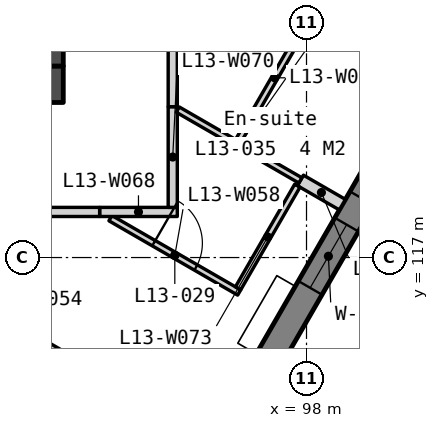
"""IFC4 building model, lengths in metres.
Left out: names, types, materials, properties, quantities, classifications, styles, units other than length and angle.
Written with IfcOpenShell. Run it as: python <this file> out.ifc"""

import sys

from ifc_helpers import new_model, si_unit, direction, frame, frame_2d, origin, place, context, subcontext, project, spatial, polyline, rectangle, outline, extrude, element, fill, save


model = new_model("IFC4")
c1 = context("Model", 3, precision=1e-05, world=origin(), true_north=direction((0.0, 1.0)))
c2 = subcontext(c1, "Body", "Model", "MODEL_VIEW")
j1 = project(units=[si_unit("LENGTHUNIT", "METRE"), si_unit("PLANEANGLEUNIT", "RADIAN")], contexts=[c1])
p1 = place(None, origin())
s1 = spatial("IfcSite", under=j1, at=p1, CompositionType="ELEMENT")
p2 = place(p1, origin())
s2 = spatial("IfcBuilding", under=s1, at=p2, CompositionType="ELEMENT")
p3 = place(p2, frame((0.0, 0.0, 59.5)))
s3 = spatial("IfcBuildingStorey", under=s2, at=p3, CompositionType="ELEMENT", Elevation=59.5)
p4 = place(p3, frame((66.0, 119.85, 0.0), z_axis=(0.0, 0.0, 1.0), x_axis=(1.0, 0.0, 0.0)))
e1 = element("IfcWall", 1, at=p4, inside=s3, PredefinedType="SOLIDWALL", context=c2, shape_type="SweptSolid", body=[
    extrude(rectangle(XDim=28.0, YDim=0.6, at=frame_2d((14.0, 0.0))), origin(), (0.0, 0.0, 1.0), 3.35),
])
p5 = place(p4, frame((6.825, 0.0, 0.0)))
e2 = element("IfcOpeningElement", 2, at=p5, cuts=e1, PredefinedType="OPENING", context=c2, shape_type="SweptSolid", body=[
    extrude(rectangle(XDim=1.8, YDim=2.1, at=frame_2d((0.9, 1.05))), frame((0.0, 0.31, 0.0), z_axis=(0.0, -1.0, 0.0), x_axis=(1.0, 0.0, 0.0)), (0.0, 0.0, 1.0), 0.62),
])
p6 = place(p4, frame((15.85, 0.0, 0.0)))
e3 = element("IfcOpeningElement", 3, at=p6, cuts=e1, PredefinedType="OPENING", context=c2, shape_type="SweptSolid", body=[
    extrude(rectangle(XDim=1.5, YDim=2.1, at=frame_2d((0.75, 1.05))), frame((0.0, 0.31, 0.0), z_axis=(0.0, -1.0, 0.0), x_axis=(1.0, 0.0, 0.0)), (0.0, 0.0, 1.0), 0.62),
])
p7 = place(p4, frame((19.375, 0.0, 0.0)))
e4 = element("IfcOpeningElement", 4, at=p7, cuts=e1, PredefinedType="OPENING", context=c2, shape_type="SweptSolid", body=[
    extrude(rectangle(XDim=1.8, YDim=2.1, at=frame_2d((0.9, 1.05))), frame((0.0, 0.31, 0.0), z_axis=(0.0, -1.0, 0.0), x_axis=(1.0, 0.0, 0.0)), (0.0, 0.0, 1.0), 0.62),
])
p8 = place(p4, frame((4.425, 0.0, 0.0)))
e5 = element("IfcOpeningElement", 5, at=p8, cuts=e1, PredefinedType="OPENING", context=c2, shape_type="SweptSolid", body=[
    extrude(rectangle(XDim=1.0, YDim=2.1, at=frame_2d((0.5, 1.05))), frame((0.0, 0.31, 0.0), z_axis=(0.0, -1.0, 0.0), x_axis=(1.0, 0.0, 0.0)), (0.0, 0.0, 1.0), 0.62),
])
p9 = place(p4, frame((9.925, 0.0, 0.0)))
e6 = element("IfcOpeningElement", 6, at=p9, cuts=e1, PredefinedType="OPENING", context=c2, shape_type="SweptSolid", body=[
    extrude(rectangle(XDim=1.0, YDim=2.1, at=frame_2d((0.5, 1.05))), frame((0.0, 0.31, 0.0), z_axis=(0.0, -1.0, 0.0), x_axis=(1.0, 0.0, 0.0)), (0.0, 0.0, 1.0), 0.62),
])
p10 = place(p4, frame((13.125, 0.0, 0.0)))
e7 = element("IfcOpeningElement", 7, at=p10, cuts=e1, PredefinedType="OPENING", context=c2, shape_type="SweptSolid", body=[
    extrude(rectangle(XDim=1.0, YDim=2.1, at=frame_2d((0.5, 1.05))), frame((0.0, 0.31, 0.0), z_axis=(0.0, -1.0, 0.0), x_axis=(1.0, 0.0, 0.0)), (0.0, 0.0, 1.0), 0.62),
])
p11 = place(p4, frame((21.725, 0.0, 0.0)))
e8 = element("IfcOpeningElement", 8, at=p11, cuts=e1, PredefinedType="OPENING", context=c2, shape_type="SweptSolid", body=[
    extrude(rectangle(XDim=1.0, YDim=2.1, at=frame_2d((0.5, 1.05))), frame((0.0, 0.31, 0.0), z_axis=(0.0, -1.0, 0.0), x_axis=(1.0, 0.0, 0.0)), (0.0, 0.0, 1.0), 0.62),
])
p12 = place(p4, frame((23.425, 0.0, 0.0)))
e9 = element("IfcOpeningElement", 9, at=p12, cuts=e1, PredefinedType="OPENING", context=c2, shape_type="SweptSolid", body=[
    extrude(rectangle(XDim=1.0, YDim=2.1, at=frame_2d((0.5, 1.05))), frame((0.0, 0.31, 0.0), z_axis=(0.0, -1.0, 0.0), x_axis=(1.0, 0.0, 0.0)), (0.0, 0.0, 1.0), 0.62),
])
p13 = place(p3, frame((93.7, 133.95, 0.0), z_axis=(0.0, 0.0, 1.0), x_axis=(0.0, -1.0, 0.0)))
e10 = element("IfcWall", 10, at=p13, inside=s3, PredefinedType="SOLIDWALL", context=c2, shape_type="SweptSolid", body=[
    extrude(rectangle(XDim=13.8, YDim=0.6, at=frame_2d((6.9, 0.0))), origin(), (0.0, 0.0, 1.0), 3.35),
])
p14 = place(p13, frame((0.6, 0.0, 0.0)))
e11 = element("IfcOpeningElement", 11, at=p14, cuts=e10, PredefinedType="OPENING", context=c2, shape_type="SweptSolid", body=[
    extrude(rectangle(XDim=1.1, YDim=2.1, at=frame_2d((0.55, 1.05))), frame((0.0, 0.31, 0.0), z_axis=(0.0, -1.0, 0.0), x_axis=(1.0, 0.0, 0.0)), (0.0, 0.0, 1.0), 0.62),
])
p15 = place(p13, frame((10.064, 0.0, 0.0)))
e12 = element("IfcOpeningElement", 12, at=p15, cuts=e10, PredefinedType="OPENING", context=c2, shape_type="SweptSolid", body=[
    extrude(rectangle(XDim=1.0, YDim=2.1, at=frame_2d((0.5, 1.05))), frame((0.0, 0.31, 0.0), z_axis=(0.0, -1.0, 0.0), x_axis=(1.0, 0.0, 0.0)), (0.0, 0.0, 1.0), 0.62),
])
p16 = place(p13, frame((8.35, 0.0, 0.0)))
e13 = element("IfcOpeningElement", 13, at=p16, cuts=e10, PredefinedType="OPENING", context=c2, shape_type="SweptSolid", body=[
    extrude(rectangle(XDim=0.85, YDim=2.1, at=frame_2d((0.425, 1.05))), frame((0.0, 0.31, 0.0), z_axis=(0.0, -1.0, 0.0), x_axis=(1.0, 0.0, 0.0)), (0.0, 0.0, 1.0), 0.62),
])
p17 = place(p13, frame((12.239, 0.0, 0.0)))
e14 = element("IfcOpeningElement", 14, at=p17, cuts=e10, PredefinedType="OPENING", context=c2, shape_type="SweptSolid", body=[
    extrude(rectangle(XDim=1.0, YDim=2.1, at=frame_2d((0.5, 1.05))), frame((0.0, 0.31, 0.0), z_axis=(0.0, -1.0, 0.0), x_axis=(1.0, 0.0, 0.0)), (0.0, 0.0, 1.0), 0.62),
])
p18 = place(p3, frame((83.105, 90.599, -0.15), z_axis=(0.0, 0.0, 1.0), x_axis=(0.499999201451, 0.866025864826, 0.0)))
e15 = element("IfcWall", 15, at=p18, inside=s3, PredefinedType="SOLIDWALL", context=c2, shape_type="SweptSolid", body=[
    extrude(outline(polyline([(44.8, 0.0), (44.8, 3.5), (0.0, 3.5), (0.0, 0.0), (44.8, 0.0)])), frame((0.0, 0.225, 0.0), z_axis=(0.0, -1.0, 0.0), x_axis=(1.0, 0.0, 0.0)), (0.0, 0.0, 1.0), 0.45),
])
p19 = place(p18, frame((3.03, 0.0, 1.05)))
e16 = element("IfcOpeningElement", 16, at=p19, cuts=e15, PredefinedType="OPENING", context=c2, shape_type="SweptSolid", body=[
    extrude(rectangle(XDim=1.2, YDim=1.5, at=frame_2d((0.6, 0.75))), frame((0.0, 0.235, 0.0), z_axis=(0.0, -1.0, 0.0), x_axis=(1.0, 0.0, 0.0)), (0.0, 0.0, 1.0), 0.47),
])
p20 = place(p18, frame((4.73, 0.0, 1.05)))
e17 = element("IfcOpeningElement", 17, at=p20, cuts=e15, PredefinedType="OPENING", context=c2, shape_type="SweptSolid", body=[
    extrude(rectangle(XDim=1.2, YDim=1.5, at=frame_2d((0.6, 0.75))), frame((0.0, 0.235, 0.0), z_axis=(0.0, -1.0, 0.0), x_axis=(1.0, 0.0, 0.0)), (0.0, 0.0, 1.0), 0.47),
])
p21 = place(p18, frame((11.99, 0.0, 1.05)))
e18 = element("IfcOpeningElement", 18, at=p21, cuts=e15, PredefinedType="OPENING", context=c2, shape_type="SweptSolid", body=[
    extrude(rectangle(XDim=1.2, YDim=1.5, at=frame_2d((0.6, 0.75))), frame((0.0, 0.235, 0.0), z_axis=(0.0, -1.0, 0.0), x_axis=(1.0, 0.0, 0.0)), (0.0, 0.0, 1.0), 0.47),
])
p22 = place(p18, frame((13.69, 0.0, 1.05)))
e19 = element("IfcOpeningElement", 19, at=p22, cuts=e15, PredefinedType="OPENING", context=c2, shape_type="SweptSolid", body=[
    extrude(rectangle(XDim=1.2, YDim=1.5, at=frame_2d((0.6, 0.75))), frame((0.0, 0.235, 0.0), z_axis=(0.0, -1.0, 0.0), x_axis=(1.0, 0.0, 0.0)), (0.0, 0.0, 1.0), 0.47),
])
p23 = place(p18, frame((20.95, 0.0, 1.05)))
e20 = element("IfcOpeningElement", 20, at=p23, cuts=e15, PredefinedType="OPENING", context=c2, shape_type="SweptSolid", body=[
    extrude(rectangle(XDim=1.2, YDim=1.5, at=frame_2d((0.6, 0.75))), frame((0.0, 0.235, 0.0), z_axis=(0.0, -1.0, 0.0), x_axis=(1.0, 0.0, 0.0)), (0.0, 0.0, 1.0), 0.47),
])
p24 = place(p18, frame((22.65, 0.0, 1.05)))
e21 = element("IfcOpeningElement", 21, at=p24, cuts=e15, PredefinedType="OPENING", context=c2, shape_type="SweptSolid", body=[
    extrude(rectangle(XDim=1.2, YDim=1.5, at=frame_2d((0.6, 0.75))), frame((0.0, 0.235, 0.0), z_axis=(0.0, -1.0, 0.0), x_axis=(1.0, 0.0, 0.0)), (0.0, 0.0, 1.0), 0.47),
])
p25 = place(p18, frame((29.91, 0.0, 1.05)))
e22 = element("IfcOpeningElement", 22, at=p25, cuts=e15, PredefinedType="OPENING", context=c2, shape_type="SweptSolid", body=[
    extrude(rectangle(XDim=1.2, YDim=1.5, at=frame_2d((0.6, 0.75))), frame((0.0, 0.235, 0.0), z_axis=(0.0, -1.0, 0.0), x_axis=(1.0, 0.0, 0.0)), (0.0, 0.0, 1.0), 0.47),
])
p26 = place(p18, frame((31.61, 0.0, 1.05)))
e23 = element("IfcOpeningElement", 23, at=p26, cuts=e15, PredefinedType="OPENING", context=c2, shape_type="SweptSolid", body=[
    extrude(rectangle(XDim=1.2, YDim=1.5, at=frame_2d((0.6, 0.75))), frame((0.0, 0.235, 0.0), z_axis=(0.0, -1.0, 0.0), x_axis=(1.0, 0.0, 0.0)), (0.0, 0.0, 1.0), 0.47),
])
p27 = place(p18, frame((38.87, 0.0, 1.05)))
e24 = element("IfcOpeningElement", 24, at=p27, cuts=e15, PredefinedType="OPENING", context=c2, shape_type="SweptSolid", body=[
    extrude(rectangle(XDim=1.2, YDim=1.5, at=frame_2d((0.6, 0.75))), frame((0.0, 0.235, 0.0), z_axis=(0.0, -1.0, 0.0), x_axis=(1.0, 0.0, 0.0)), (0.0, 0.0, 1.0), 0.47),
])
p28 = place(p18, frame((40.57, 0.0, 1.05)))
e25 = element("IfcOpeningElement", 25, at=p28, cuts=e15, PredefinedType="OPENING", context=c2, shape_type="SweptSolid", body=[
    extrude(rectangle(XDim=1.2, YDim=1.5, at=frame_2d((0.6, 0.75))), frame((0.0, 0.235, 0.0), z_axis=(0.0, -1.0, 0.0), x_axis=(1.0, 0.0, 0.0)), (0.0, 0.0, 1.0), 0.47),
])
p29 = place(p3, frame((90.751, 117.223, 0.0), z_axis=(0.0, 0.0, 1.0), x_axis=(0.866015162859, -0.500017737384, 0.0)))
e26 = element("IfcWall", 26, at=p29, inside=s3, PredefinedType="PARTITIONING", context=c2, shape_type="SweptSolid", body=[
    extrude(rectangle(XDim=6.465, YDim=0.2, at=frame_2d((3.232, 0.0))), origin(), (0.0, 0.0, 1.0), 3.35),
])
p30 = place(p3, frame((94.775, 117.647, 0.0), z_axis=(0.0, 0.0, 1.0), x_axis=(0.86604092097, -0.499973122483, 0.0)))
e27 = element("IfcWall", 27, at=p30, inside=s3, PredefinedType="PARTITIONING", context=c2, shape_type="SweptSolid", body=[
    extrude(rectangle(XDim=2.445, YDim=0.1, at=frame_2d((1.223, 0.0))), origin(), (0.0, 0.0, 1.0), 3.35),
])
p31 = place(p30, frame((0.823, 0.0, 0.0)))
e28 = element("IfcOpeningElement", 28, at=p31, cuts=e27, PredefinedType="OPENING", context=c2, shape_type="SweptSolid", body=[
    extrude(rectangle(XDim=0.8, YDim=2.1, at=frame_2d((0.4, 1.05))), frame((0.0, 0.06, 0.0), z_axis=(0.0, -1.0, 0.0), x_axis=(1.0, 0.0, 0.0)), (0.0, 0.0, 1.0), 0.12),
])
p32 = place(p3, frame((94.598, 117.75, 0.0), z_axis=(0.0, 0.0, 1.0), x_axis=(1.0, 0.0, 0.0)))
e29 = element("IfcWall", 29, at=p32, inside=s3, PredefinedType="PARTITIONING", context=c2, shape_type="SweptSolid", body=[
    extrude(rectangle(XDim=1.277, YDim=0.15, at=frame_2d((0.639, 0.0))), origin(), (0.0, 0.0, 1.0), 3.35),
])
p33 = place(p3, frame((91.088, 117.75, 0.0), z_axis=(0.0, 0.0, 1.0), x_axis=(1.0, 0.0, 0.0)))
e30 = element("IfcWall", 30, at=p33, inside=s3, PredefinedType="PARTITIONING", context=c2, shape_type="SweptSolid", body=[
    extrude(rectangle(XDim=3.51, YDim=0.15, at=frame_2d((1.755, 0.0))), origin(), (0.0, 0.0, 1.0), 3.35),
])
p34 = place(p33, frame((1.305, 0.0, 0.0)))
e31 = element("IfcOpeningElement", 31, at=p34, cuts=e30, PredefinedType="OPENING", context=c2, shape_type="SweptSolid", body=[
    extrude(rectangle(XDim=0.9, YDim=2.1, at=frame_2d((0.45, 1.05))), frame((0.0, 0.085, 0.0), z_axis=(0.0, -1.0, 0.0), x_axis=(1.0, 0.0, 0.0)), (0.0, 0.0, 1.0), 0.17),
])
p35 = place(p3, frame((95.8, 117.825, 0.0), z_axis=(0.0, 0.0, 1.0), x_axis=(0.0, 1.0, 0.0)))
e32 = element("IfcWall", 32, at=p35, inside=s3, PredefinedType="PARTITIONING", context=c2, shape_type="SweptSolid", body=[
    extrude(rectangle(XDim=1.656, YDim=0.15, at=frame_2d((0.828, 0.0))), origin(), (0.0, 0.0, 1.0), 3.35),
])
p36 = place(p3, frame((97.9, 118.269, 0.0), z_axis=(0.0, 0.0, 1.0), x_axis=(0.866068339032, -0.499925626596, 0.0)))
e33 = element("IfcWall", 33, at=p36, inside=s3, PredefinedType="PARTITIONING", context=c2, shape_type="SweptSolid", body=[
    extrude(rectangle(XDim=0.797, YDim=0.2, at=frame_2d((0.399, 0.0))), origin(), (0.0, 0.0, 1.0), 3.35),
])
p37 = place(p3, frame((96.875, 116.493, 0.0), z_axis=(0.0, 0.0, 1.0), x_axis=(0.500043961785, 0.866000020948, 0.0)))
e34 = element("IfcWall", 34, at=p37, inside=s3, PredefinedType="PARTITIONING", context=c2, shape_type="SweptSolid", body=[
    extrude(rectangle(XDim=1.95, YDim=0.1, at=frame_2d((0.975, 0.0))), origin(), (0.0, 0.0, 1.0), 3.35),
])
p38 = place(p3, frame((95.882, 119.433, 0.0), z_axis=(0.0, 0.0, 1.0), x_axis=(0.866009305107, -0.50002788269, 0.0)))
e35 = element("IfcWall", 35, at=p38, inside=s3, PredefinedType="PARTITIONING", context=c2, shape_type="SweptSolid", body=[
    extrude(rectangle(XDim=2.329, YDim=0.1, at=frame_2d((1.165, 0.0))), origin(), (0.0, 0.0, 1.0), 3.35),
])
p39 = place(p3, frame((95.8, 119.481, 0.0), z_axis=(0.0, 0.0, 1.0), x_axis=(0.0, 1.0, 0.0)))
e36 = element("IfcWall", 36, at=p39, inside=s3, PredefinedType="PARTITIONING", context=c2, shape_type="SweptSolid", body=[
    extrude(rectangle(XDim=2.771, YDim=0.15, at=frame_2d((1.386, 0.0))), origin(), (0.0, 0.0, 1.0), 3.35),
])
p40 = place(p3, frame((96.877, 118.917, 0.0), z_axis=(0.0, 0.0, 1.0), x_axis=(0.500001309137, 0.866024647952, 0.0)))
e37 = element("IfcWall", 37, at=p40, inside=s3, PredefinedType="PARTITIONING", context=c2, shape_type="SweptSolid", body=[
    extrude(rectangle(XDim=2.4, YDim=0.1, at=frame_2d((1.2, 0.0))), origin(), (0.0, 0.0, 1.0), 3.35),
])
p41 = place(p25, origin())
e38 = element("IfcWindow", 38, at=p41, inside=s3, PartitioningType="SINGLE_PANEL", PredefinedType="WINDOW", context=c2, shape_type="SweptSolid", body=[
    extrude(rectangle(XDim=1.2, YDim=1.5, at=frame_2d((0.6, 0.75))), frame((0.0, 0.03, 0.0), z_axis=(0.0, -1.0, 0.0), x_axis=(1.0, 0.0, 0.0)), (0.0, 0.0, 1.0), 0.06),
])
fill(e22, e38)
p42 = place(p31, origin())
e39 = element("IfcDoor", 39, at=p42, inside=s3, OperationType="SINGLE_SWING_LEFT", PredefinedType="DOOR", context=c2, shape_type="SweptSolid", body=[
    extrude(rectangle(XDim=0.8, YDim=2.1, at=frame_2d((0.4, 1.05))), frame((0.0, 0.025, 0.0), z_axis=(0.0, -1.0, 0.0), x_axis=(1.0, 0.0, 0.0)), (0.0, 0.0, 1.0), 0.05),
])
fill(e28, e39)
save(model, sys.argv[1])
